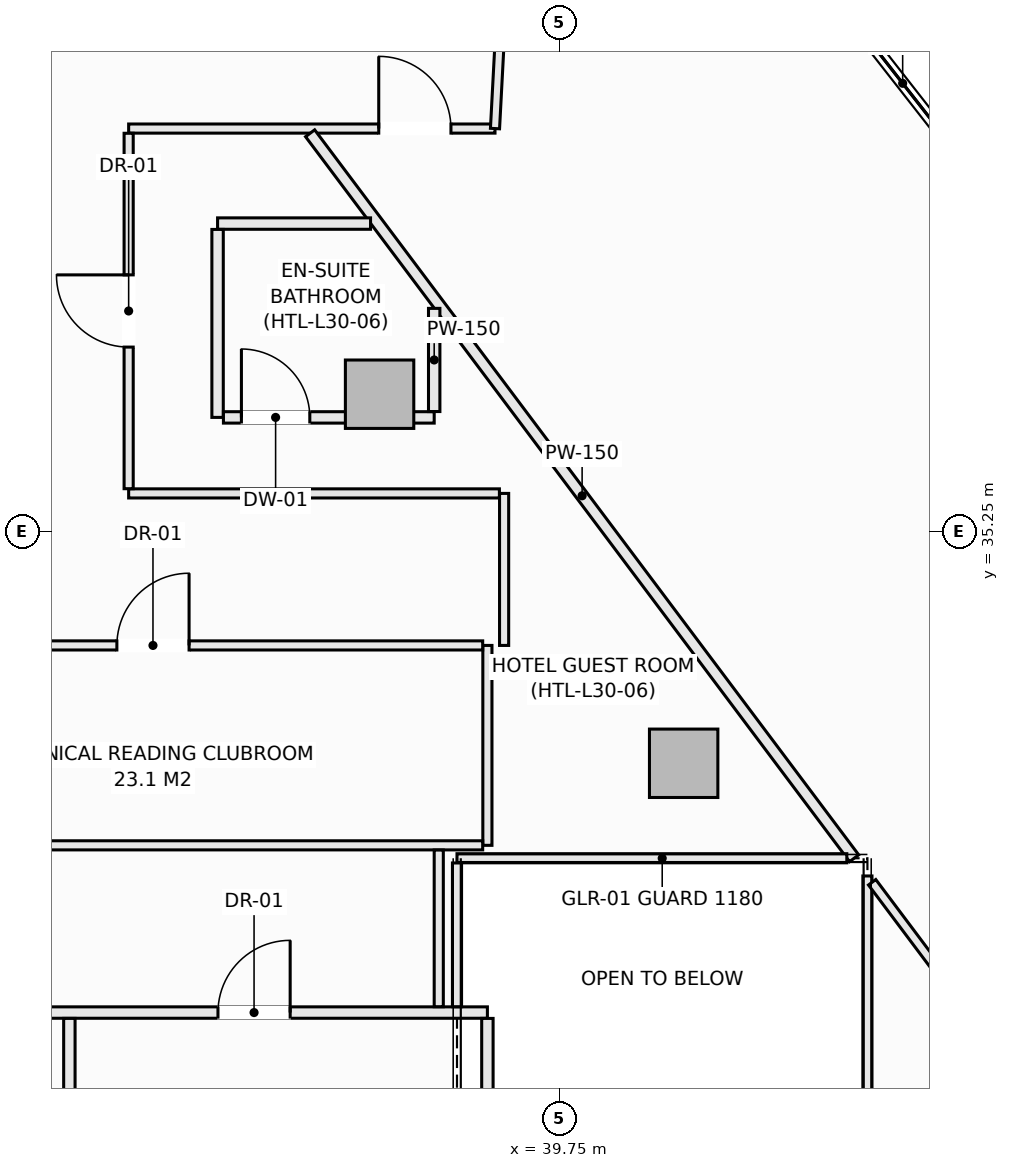
"""IFC4 building model, lengths in metres.
Left out: names, types, materials, properties, quantities, classifications, styles, units other than length and angle.
Written with IfcOpenShell. Run it as: python <this file> out.ifc"""

import sys

from ifc_helpers import new_model, si_unit, direction, frame, frame_2d, origin, origin_2d, place, context, subcontext, project, spatial, rectangle, extrude, element, fill, save


model = new_model("IFC4")
c1 = context("Model", 3, precision=1e-05, world=origin(), true_north=direction((0.0, 1.0)))
c2 = subcontext(c1, "Body", "Model", "MODEL_VIEW")
j1 = project(units=[si_unit("LENGTHUNIT", "METRE"), si_unit("PLANEANGLEUNIT", "RADIAN")], contexts=[c1])
p1 = place(None, origin())
s1 = spatial("IfcSite", under=j1, at=p1, CompositionType="ELEMENT")
p2 = place(p1, origin())
s2 = spatial("IfcBuilding", under=s1, at=p2, CompositionType="ELEMENT")
p3 = place(p2, frame((0.0, 0.0, 122.3)))
s3 = spatial("IfcBuildingStorey", under=s2, at=p3, CompositionType="ELEMENT", Elevation=122.3)
for number, where, z_axis, x_axis in (
    (1, (41.382, 32.199, -0.27), (0.0, 0.0, 1.0), (1.0, 0.0, 0.0)),
    (2, (37.382, 37.055, -0.27), (0.0, 0.0, 1.0), (1.0, 0.0, 0.0)),
):
    element("IfcColumn", number, at=place(p3, frame(where, z_axis=z_axis, x_axis=x_axis)), inside=s3, PredefinedType="COLUMN", context=c2, shape_type="SweptSolid", body=[
        extrude(rectangle(XDim=0.9, YDim=0.9, at=origin_2d()), origin(), (0.0, 0.0, 1.0), 3.4),
    ])
p4 = place(p3, frame((30.077, 28.92, 0.0), z_axis=(0.0, 0.0, 1.0), x_axis=(1.0, 0.0, 0.0)))
e3 = element("IfcWall", 3, at=p4, inside=s3, PredefinedType="PARTITIONING", context=c2, shape_type="SweptSolid", body=[
    extrude(rectangle(XDim=8.723, YDim=0.15, at=frame_2d((4.362, 0.0))), origin(), (0.0, 0.0, 1.0), 3.13),
])
p5 = place(p4, frame((1.342, 0.0, 0.0)))
e4 = element("IfcOpeningElement", 4, at=p5, cuts=e3, PredefinedType="OPENING", context=c2, shape_type="SweptSolid", body=[
    extrude(rectangle(XDim=0.95, YDim=2.1, at=frame_2d((0.475, 1.05))), frame((0.0, 0.085, 0.0), z_axis=(0.0, -1.0, 0.0), x_axis=(1.0, 0.0, 0.0)), (0.0, 0.0, 1.0), 0.17),
])
p6 = place(p4, frame((5.178, 0.0, 0.0)))
e5 = element("IfcOpeningElement", 5, at=p6, cuts=e3, PredefinedType="OPENING", context=c2, shape_type="SweptSolid", body=[
    extrude(rectangle(XDim=0.95, YDim=2.1, at=frame_2d((0.475, 1.05))), frame((0.0, 0.085, 0.0), z_axis=(0.0, -1.0, 0.0), x_axis=(1.0, 0.0, 0.0)), (0.0, 0.0, 1.0), 0.17),
])
p7 = place(p3, frame((33.3, 26.877, 0.0), z_axis=(0.0, 0.0, 1.0), x_axis=(0.0, 1.0, 0.0)))
e6 = element("IfcWall", 6, at=p7, inside=s3, PredefinedType="PARTITIONING", context=c2, shape_type="SweptSolid", body=[
    extrude(rectangle(XDim=1.966, YDim=0.15, at=frame_2d((0.983, 0.0))), origin(), (0.0, 0.0, 1.0), 3.13),
])
p8 = place(p3, frame((38.8, 27.297, 0.0), z_axis=(0.0, 0.0, 1.0), x_axis=(0.0, 1.0, 0.0)))
e7 = element("IfcWall", 7, at=p8, inside=s3, PredefinedType="PARTITIONING", context=c2, shape_type="SweptSolid", body=[
    extrude(rectangle(XDim=1.546, YDim=0.15, at=frame_2d((0.773, 0.0))), origin(), (0.0, 0.0, 1.0), 3.13),
])
p9 = place(p3, frame((38.8, 31.12, 0.0), z_axis=(0.0, 0.0, 1.0), x_axis=(0.0, 1.0, 0.0)))
e8 = element("IfcWall", 8, at=p9, inside=s3, PredefinedType="PARTITIONING", context=c2, shape_type="SweptSolid", body=[
    extrude(rectangle(XDim=2.63, YDim=0.12, at=frame_2d((1.315, 0.0))), origin(), (0.0, 0.0, 1.0), 3.13),
])
p10 = place(p3, frame((30.062, 31.12, 0.0), z_axis=(0.0, 0.0, 1.0), x_axis=(1.0, 0.0, 0.0)))
e9 = element("IfcWall", 9, at=p10, inside=s3, PredefinedType="PARTITIONING", context=c2, shape_type="SweptSolid", body=[
    extrude(rectangle(XDim=8.676, YDim=0.12, at=frame_2d((4.338, 0.0))), origin(), (0.0, 0.0, 1.0), 3.13),
])
p11 = place(p3, frame((30.062, 33.75, 0.0), z_axis=(0.0, 0.0, 1.0), x_axis=(1.0, 0.0, 0.0)))
e10 = element("IfcWall", 10, at=p11, inside=s3, PredefinedType="PARTITIONING", context=c2, shape_type="SweptSolid", body=[
    extrude(rectangle(XDim=8.676, YDim=0.12, at=frame_2d((4.338, 0.0))), origin(), (0.0, 0.0, 1.0), 3.13),
])
p12 = place(p11, frame((3.863, 0.0, 0.0)))
e11 = element("IfcOpeningElement", 11, at=p12, cuts=e10, PredefinedType="OPENING", context=c2, shape_type="SweptSolid", body=[
    extrude(rectangle(XDim=0.95, YDim=2.1, at=frame_2d((0.475, 1.05))), frame((0.0, 0.07, 0.0), z_axis=(0.0, -1.0, 0.0), x_axis=(1.0, 0.0, 0.0)), (0.0, 0.0, 1.0), 0.14),
])
p13 = place(p3, frame((39.02, 33.75, 0.0), z_axis=(0.0, 0.0, 1.0), x_axis=(0.0, 1.0, 0.0)))
e12 = element("IfcWall", 12, at=p13, inside=s3, PredefinedType="PARTITIONING", context=c2, shape_type="SweptSolid", body=[
    extrude(rectangle(XDim=2.0, YDim=0.12, at=frame_2d((1.0, 0.0))), origin(), (0.0, 0.0, 1.0), 3.13),
])
p14 = place(p3, frame((34.08, 35.75, 0.0), z_axis=(0.0, 0.0, 1.0), x_axis=(1.0, 0.0, 0.0)))
e13 = element("IfcWall", 13, at=p14, inside=s3, PredefinedType="PARTITIONING", context=c2, shape_type="SweptSolid", body=[
    extrude(rectangle(XDim=4.878, YDim=0.12, at=frame_2d((2.439, 0.0))), origin(), (0.0, 0.0, 1.0), 2.505),
])
p15 = place(p3, frame((34.08, 40.55, 0.0), z_axis=(0.0, 0.0, 1.0), x_axis=(1.0, 0.0, 0.0)))
e14 = element("IfcWall", 14, at=p15, inside=s3, PredefinedType="PARTITIONING", context=c2, shape_type="SweptSolid", body=[
    extrude(rectangle(XDim=4.82, YDim=0.12, at=frame_2d((2.41, 0.0))), origin(), (0.0, 0.0, 1.0), 3.13),
])
p16 = place(p15, frame((3.291, 0.0, 0.0)))
e15 = element("IfcOpeningElement", 15, at=p16, cuts=e14, PredefinedType="OPENING", context=c2, shape_type="SweptSolid", body=[
    extrude(rectangle(XDim=0.95, YDim=2.1, at=frame_2d((0.475, 1.05))), frame((0.0, 0.07, 0.0), z_axis=(0.0, -1.0, 0.0), x_axis=(1.0, 0.0, 0.0)), (0.0, 0.0, 1.0), 0.14),
])
p17 = place(p3, frame((38.9, 40.55, 0.0), z_axis=(0.0, 0.0, 1.0), x_axis=(0.052810816763, 0.998604535155, 0.0)))
e16 = element("IfcWall", 16, at=p17, inside=s3, PredefinedType="PARTITIONING", context=c2, shape_type="SweptSolid", body=[
    extrude(rectangle(XDim=1.271, YDim=0.12, at=frame_2d((0.636, 0.0))), origin(), (0.0, 0.0, 1.0), 3.13),
])
p18 = place(p3, frame((34.08, 35.812, 0.0), z_axis=(0.0, 0.0, 1.0), x_axis=(0.0, 1.0, 0.0)))
e17 = element("IfcWall", 17, at=p18, inside=s3, PredefinedType="PARTITIONING", context=c2, shape_type="SweptSolid", body=[
    extrude(rectangle(XDim=4.676, YDim=0.12, at=frame_2d((2.338, 0.0))), origin(), (0.0, 0.0, 1.0), 2.812),
])
p19 = place(p18, frame((1.863, 0.0, 0.0)))
e18 = element("IfcOpeningElement", 18, at=p19, cuts=e17, PredefinedType="OPENING", context=c2, shape_type="SweptSolid", body=[
    extrude(rectangle(XDim=0.95, YDim=2.1, at=frame_2d((0.475, 1.05))), frame((0.0, 0.07, 0.0), z_axis=(0.0, -1.0, 0.0), x_axis=(1.0, 0.0, 0.0)), (0.0, 0.0, 1.0), 0.14),
])
p20 = place(p3, frame((38.16, 28.997, 0.0), z_axis=(0.0, 0.0, 1.0), x_axis=(0.0, 1.0, 0.0)))
e19 = element("IfcWall", 19, at=p20, inside=s3, PredefinedType="PARTITIONING", context=c2, shape_type="SweptSolid", body=[
    extrude(rectangle(XDim=2.061, YDim=0.12, at=frame_2d((1.031, 0.0))), origin(), (0.0, 0.0, 1.0), 3.13),
])
p21 = place(p3, frame((43.8, 27.812, 0.0), z_axis=(0.0, 0.0, 1.0), x_axis=(0.0, 1.0, 0.0)))
e20 = element("IfcWall", 20, at=p21, inside=s3, PredefinedType="PARTITIONING", context=c2, shape_type="SweptSolid", body=[
    extrude(rectangle(XDim=2.905, YDim=0.12, at=frame_2d((1.453, 0.0))), origin(), (0.0, 0.0, 1.0), 3.13),
])
p22 = place(p3, frame((36.468, 40.488, 0.0), z_axis=(0.0, 0.0, 1.0), x_axis=(0.600219452556, -0.799835363543, 0.0)))
e21 = element("IfcWall", 21, at=p22, inside=s3, PredefinedType="PARTITIONING", context=c2, shape_type="SweptSolid", body=[
    extrude(rectangle(XDim=11.925, YDim=0.15, at=frame_2d((5.962, 0.0))), origin(), (0.0, 0.0, 1.0), 3.13),
])
p23 = place(p3, frame((43.862, 30.635, 0.0), z_axis=(0.0, 0.0, 1.0), x_axis=(0.600213311992, -0.799839971561, 0.0)))
e22 = element("IfcWall", 22, at=p23, inside=s3, PredefinedType="PARTITIONING", context=c2, shape_type="SweptSolid", body=[
    extrude(rectangle(XDim=13.733, YDim=0.12, at=frame_2d((6.866, 0.0))), origin(), (0.0, 0.0, 1.0), 3.13),
])
p24 = place(p3, frame((38.4, 30.95, 0.0), z_axis=(0.0, 0.0, 1.0), x_axis=(1.0, 0.0, 0.0)))
e23 = element("IfcWall", 23, at=p24, inside=s3, PredefinedType="PARTITIONING", context=c2, shape_type="SweptSolid", body=[
    extrude(rectangle(XDim=5.129, YDim=0.12, at=frame_2d((2.564, 0.0))), origin(), (0.0, 0.0, 1.0), 3.13),
])
p25 = place(p3, frame((38.4, 28.997, 0.0), z_axis=(0.0, 0.0, 1.0), x_axis=(0.0, 1.0, 0.0)))
e24 = element("IfcWall", 24, at=p25, inside=s3, PredefinedType="PARTITIONING", context=c2, shape_type="SweptSolid", body=[
    extrude(rectangle(XDim=1.891, YDim=0.12, at=frame_2d((0.945, 0.0))), origin(), (0.0, 0.0, 1.0), 3.13),
])
p26 = place(p3, frame((35.25, 39.3, 0.0), z_axis=(0.0, 0.0, 1.0), x_axis=(1.0, 0.0, 0.0)))
e25 = element("IfcWall", 25, at=p26, inside=s3, PredefinedType="PARTITIONING", context=c2, shape_type="SweptSolid", body=[
    extrude(rectangle(XDim=2.013, YDim=0.15, at=frame_2d((1.006, 0.0))), origin(), (0.0, 0.0, 1.0), 3.13),
])
p27 = place(p3, frame((35.25, 36.75, 0.0), z_axis=(0.0, 0.0, 1.0), x_axis=(0.0, 1.0, 0.0)))
e26 = element("IfcWall", 26, at=p27, inside=s3, PredefinedType="PARTITIONING", context=c2, shape_type="SweptSolid", body=[
    extrude(rectangle(XDim=2.473, YDim=0.15, at=frame_2d((1.236, 0.0))), origin(), (0.0, 0.0, 1.0), 3.13),
])
p28 = place(p3, frame((35.327, 36.75, 0.0), z_axis=(0.0, 0.0, 1.0), x_axis=(1.0, 0.0, 0.0)))
e27 = element("IfcWall", 27, at=p28, inside=s3, PredefinedType="PARTITIONING", context=c2, shape_type="SweptSolid", body=[
    extrude(rectangle(XDim=2.773, YDim=0.15, at=frame_2d((1.387, 0.0))), origin(), (0.0, 0.0, 1.0), 2.505),
])
p29 = place(p28, frame((0.237, 0.0, 0.0)))
e28 = element("IfcOpeningElement", 28, at=p29, cuts=e27, PredefinedType="OPENING", context=c2, shape_type="SweptSolid", body=[
    extrude(rectangle(XDim=0.9, YDim=2.1, at=frame_2d((0.45, 1.05))), frame((0.0, 0.085, 0.0), z_axis=(0.0, -1.0, 0.0), x_axis=(1.0, 0.0, 0.0)), (0.0, 0.0, 1.0), 0.17),
])
p30 = place(p3, frame((38.1, 36.827, 0.0), z_axis=(0.0, 0.0, 1.0), x_axis=(0.0, 1.0, 0.0)))
e29 = element("IfcWall", 29, at=p30, inside=s3, PredefinedType="PARTITIONING", context=c2, shape_type="SweptSolid", body=[
    extrude(rectangle(XDim=1.357, YDim=0.15, at=frame_2d((0.679, 0.0))), origin(), (0.0, 0.0, 1.0), 2.505),
])
p31 = place(p6, origin())
e30 = element("IfcDoor", 30, at=p31, inside=s3, OperationType="SINGLE_SWING_RIGHT", PredefinedType="DOOR", context=c2, shape_type="SweptSolid", body=[
    extrude(rectangle(XDim=0.95, YDim=2.1, at=frame_2d((0.475, 1.05))), frame((0.0, 0.025, 0.0), z_axis=(0.0, -1.0, 0.0), x_axis=(1.0, 0.0, 0.0)), (0.0, 0.0, 1.0), 0.05),
])
fill(e5, e30)
p32 = place(p12, origin())
e31 = element("IfcDoor", 31, at=p32, inside=s3, OperationType="SINGLE_SWING_RIGHT", PredefinedType="DOOR", context=c2, shape_type="SweptSolid", body=[
    extrude(rectangle(XDim=0.95, YDim=2.1, at=frame_2d((0.475, 1.05))), frame((0.0, 0.025, 0.0), z_axis=(0.0, -1.0, 0.0), x_axis=(1.0, 0.0, 0.0)), (0.0, 0.0, 1.0), 0.05),
])
fill(e11, e31)
p33 = place(p16, origin())
e32 = element("IfcDoor", 32, at=p33, inside=s3, OperationType="SINGLE_SWING_LEFT", PredefinedType="DOOR", context=c2, shape_type="SweptSolid", body=[
    extrude(rectangle(XDim=0.95, YDim=2.1, at=frame_2d((0.475, 1.05))), frame((0.0, 0.025, 0.0), z_axis=(0.0, -1.0, 0.0), x_axis=(1.0, 0.0, 0.0)), (0.0, 0.0, 1.0), 0.05),
])
fill(e15, e32)
p34 = place(p19, origin())
e33 = element("IfcDoor", 33, at=p34, inside=s3, OperationType="SINGLE_SWING_RIGHT", PredefinedType="DOOR", context=c2, shape_type="SweptSolid", body=[
    extrude(rectangle(XDim=0.95, YDim=2.1, at=frame_2d((0.475, 1.05))), frame((0.0, 0.025, 0.0), z_axis=(0.0, -1.0, 0.0), x_axis=(1.0, 0.0, 0.0)), (0.0, 0.0, 1.0), 0.05),
])
fill(e18, e33)
p35 = place(p29, origin())
e34 = element("IfcDoor", 34, at=p35, inside=s3, OperationType="SINGLE_SWING_LEFT", PredefinedType="DOOR", context=c2, shape_type="SweptSolid", body=[
    extrude(rectangle(XDim=0.9, YDim=2.1, at=frame_2d((0.45, 1.05))), frame((0.0, 0.025, 0.0), z_axis=(0.0, -1.0, 0.0), x_axis=(1.0, 0.0, 0.0)), (0.0, 0.0, 1.0), 0.05),
])
fill(e28, e34)
save(model, sys.argv[1])
